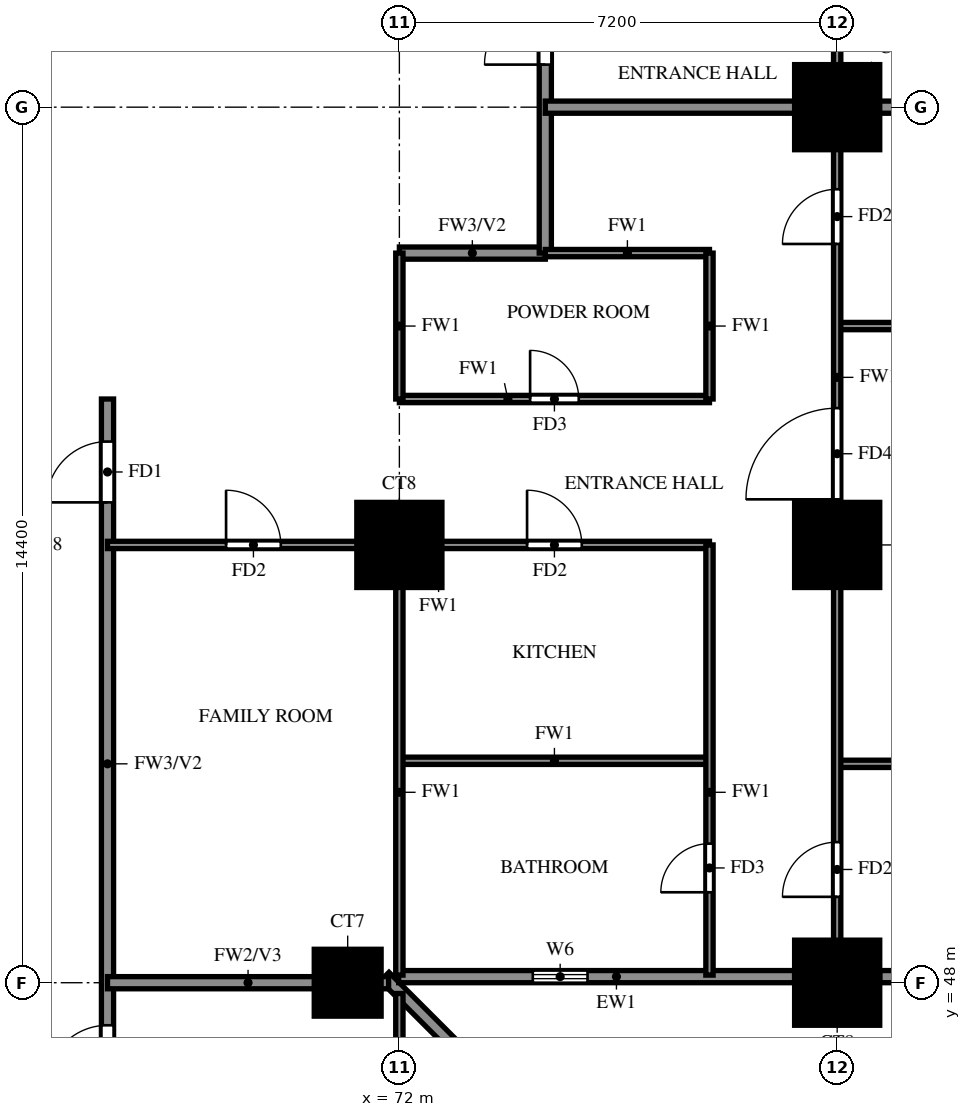
"""IFC4 building model, lengths in metres.
Left out: names, types, materials, properties, quantities, classifications, styles, units other than length and angle.
Written with IfcOpenShell. Run it as: python <this file> out.ifc"""

import sys

from ifc_helpers import new_model, si_unit, direction, frame, frame_2d, origin, origin_2d, place, context, subcontext, project, spatial, rectangle, extrude, source, transform, mapped, element, fill, save


model = new_model("IFC4")
c1 = context("Model", 3, precision=1e-05, world=origin(), true_north=direction((0.0, 1.0)))
c2 = subcontext(c1, "Body", "Model", "MODEL_VIEW")
j1 = project(units=[si_unit("LENGTHUNIT", "METRE"), si_unit("PLANEANGLEUNIT", "RADIAN")], contexts=[c1])
p1 = place(None, origin())
s1 = spatial("IfcSite", under=j1, at=p1, CompositionType="ELEMENT")
p2 = place(p1, origin())
s2 = spatial("IfcBuilding", under=s1, at=p2, CompositionType="ELEMENT")
p3 = place(p2, frame((0.0, 0.0, 41.0)))
s3 = spatial("IfcBuildingStorey", under=s2, at=p3, CompositionType="ELEMENT", Elevation=41.0)
m1 = source(origin(), c2, "Body", "SweptSolid", [
    extrude(rectangle(XDim=1.1, YDim=1.1, at=origin_2d()), origin(), (0.0, 0.0, 1.0), 3.18),
])
p4 = place(p3, frame((71.15, 48.0, 0.0), z_axis=(0.0, 0.0, 1.0), x_axis=(1.0, 0.0, 0.0)))
e1 = element("IfcColumn", 1, at=p4, inside=s3, PredefinedType="COLUMN", context=c2, shape_type="MappedRepresentation", body=[
    mapped(m1, transform((0.0, 0.0, 0.0))),
])
m2 = source(origin(), c2, "Body", "SweptSolid", [
    extrude(rectangle(XDim=1.4, YDim=1.4, at=origin_2d()), origin(), (0.0, 0.0, 1.0), 3.18),
])
for number, where, z_axis, x_axis in (
    (2, (79.2, 48.0, 0.0), (0.0, 0.0, 1.0), (1.0, 0.0, 0.0)),
    (3, (72.0, 55.2, 0.0), (0.0, 0.0, 1.0), (1.0, 0.0, 0.0)),
    (4, (79.2, 55.2, 0.0), (0.0, 0.0, 1.0), (1.0, 0.0, 0.0)),
    (5, (79.2, 62.4, 0.0), (0.0, 0.0, 1.0), (1.0, 0.0, 0.0)),
):
    element("IfcColumn", number, at=place(p3, frame(where, z_axis=z_axis, x_axis=x_axis)), inside=s3, PredefinedType="COLUMN", context=c2, shape_type="MappedRepresentation", body=[
        mapped(m2, transform((0.0, 0.0, 0.0))),
    ])
p5 = place(p3, frame((78.74, 41.118, 0.0), z_axis=(0.0, 0.0, 1.0), x_axis=(-0.707106781187, 0.707106781187, 0.0)))
e6 = element("IfcWall", 6, at=p5, inside=s3, PredefinedType="SOLIDWALL", context=c2, shape_type="SweptSolid", body=[
    extrude(rectangle(XDim=9.874, YDim=0.2, at=frame_2d((4.937, 0.0))), origin(), (0.0, 0.0, 1.0), 3.18),
])
p6 = place(p3, frame((71.989, 48.1, 0.0), z_axis=(0.0, 0.0, 1.0), x_axis=(1.0, 0.0, 0.0)))
e7 = element("IfcWall", 7, at=p6, inside=s3, PredefinedType="SOLIDWALL", context=c2, shape_type="SweptSolid", body=[
    extrude(rectangle(XDim=6.511, YDim=0.2, at=frame_2d((3.256, 0.0))), origin(), (0.0, 0.0, 1.0), 3.18),
])
p7 = place(p6, frame((2.206, 0.0, 1.5)))
e8 = element("IfcOpeningElement", 8, at=p7, cuts=e7, PredefinedType="OPENING", context=c2, shape_type="SweptSolid", body=[
    extrude(rectangle(XDim=0.9, YDim=0.9, at=frame_2d((0.45, 0.45))), frame((0.0, 0.11, 0.0), z_axis=(0.0, -1.0, 0.0), x_axis=(1.0, 0.0, 0.0)), (0.0, 0.0, 1.0), 0.22),
])
p8 = place(p3, frame((79.9, 48.1, 0.0), z_axis=(0.0, 0.0, 1.0), x_axis=(1.0, 0.0, 0.0)))
e9 = element("IfcWall", 9, at=p8, inside=s3, PredefinedType="SOLIDWALL", context=c2, shape_type="SweptSolid", body=[
    extrude(rectangle(XDim=5.35, YDim=0.2, at=frame_2d((2.675, 0.0))), origin(), (0.0, 0.0, 1.0), 3.18),
])
p9 = place(p8, frame((1.475, 0.0, 0.6)))
e10 = element("IfcOpeningElement", 10, at=p9, cuts=e9, PredefinedType="OPENING", context=c2, shape_type="SweptSolid", body=[
    extrude(rectangle(XDim=2.4, YDim=2.4, at=frame_2d((1.2, 1.2))), frame((0.0, 0.11, 0.0), z_axis=(0.0, -1.0, 0.0), x_axis=(1.0, 0.0, 0.0)), (0.0, 0.0, 1.0), 0.22),
])
p10 = place(p3, frame((72.0, 60.0, 0.0), z_axis=(0.0, 0.0, 1.0), x_axis=(1.0, 0.0, 0.0)))
e11 = element("IfcWall", 11, at=p10, inside=s3, PredefinedType="SOLIDWALL", context=c2, shape_type="SweptSolid", body=[
    extrude(rectangle(XDim=2.4, YDim=0.2, at=frame_2d((1.2, 0.0))), origin(), (0.0, 0.0, 1.0), 3.18),
])
p11 = place(p3, frame((67.2, 45.6, 0.0), z_axis=(0.0, 0.0, 1.0), x_axis=(0.0, 1.0, 0.0)))
e12 = element("IfcWall", 12, at=p11, inside=s3, PredefinedType="SOLIDWALL", context=c2, shape_type="SweptSolid", body=[
    extrude(rectangle(XDim=12.0, YDim=0.2, at=frame_2d((6.0, 0.0))), origin(), (0.0, 0.0, 1.0), 3.18),
])
p12 = place(p11, frame((10.3, 0.0, 0.0)))
e13 = element("IfcOpeningElement", 13, at=p12, cuts=e12, PredefinedType="OPENING", context=c2, shape_type="SweptSolid", body=[
    extrude(rectangle(XDim=1.0, YDim=2.1, at=frame_2d((0.5, 1.05))), frame((0.0, 0.11, 0.0), z_axis=(0.0, -1.0, 0.0), x_axis=(1.0, 0.0, 0.0)), (0.0, 0.0, 1.0), 0.22),
])
p13 = place(p11, frame((0.7, 0.0, 0.0)))
e14 = element("IfcOpeningElement", 14, at=p13, cuts=e12, PredefinedType="OPENING", context=c2, shape_type="SweptSolid", body=[
    extrude(rectangle(XDim=1.0, YDim=2.1, at=frame_2d((0.5, 1.05))), frame((0.0, 0.11, 0.0), z_axis=(0.0, -1.0, 0.0), x_axis=(1.0, 0.0, 0.0)), (0.0, 0.0, 1.0), 0.22),
])
p14 = place(p3, frame((74.4, 60.0, 0.0), z_axis=(0.0, 0.0, 1.0), x_axis=(0.0, 1.0, 0.0)))
e15 = element("IfcWall", 15, at=p14, inside=s3, PredefinedType="SOLIDWALL", context=c2, shape_type="SweptSolid", body=[
    extrude(rectangle(XDim=9.45, YDim=0.2, at=frame_2d((4.725, 0.0))), origin(), (0.0, 0.0, 1.0), 3.18),
])
p15 = place(p14, frame((3.1, 0.0, 0.0)))
e16 = element("IfcOpeningElement", 16, at=p15, cuts=e15, PredefinedType="OPENING", context=c2, shape_type="SweptSolid", body=[
    extrude(rectangle(XDim=1.0, YDim=2.1, at=frame_2d((0.5, 1.05))), frame((0.0, 0.11, 0.0), z_axis=(0.0, -1.0, 0.0), x_axis=(1.0, 0.0, 0.0)), (0.0, 0.0, 1.0), 0.22),
])
p16 = place(p3, frame((67.2, 48.0, 0.0), z_axis=(0.0, 0.0, 1.0), x_axis=(1.0, 0.0, 0.0)))
e17 = element("IfcWall", 17, at=p16, inside=s3, PredefinedType="SOLIDWALL", context=c2, shape_type="SweptSolid", body=[
    extrude(rectangle(XDim=4.623, YDim=0.2, at=frame_2d((2.312, 0.0))), origin(), (0.0, 0.0, 1.0), 3.18),
])
p17 = place(p3, frame((74.4, 62.4, 0.0), z_axis=(0.0, 0.0, 1.0), x_axis=(1.0, 0.0, 0.0)))
e18 = element("IfcWall", 18, at=p17, inside=s3, PredefinedType="SOLIDWALL", context=c2, shape_type="SweptSolid", body=[
    extrude(rectangle(XDim=11.875, YDim=0.2, at=frame_2d((5.938, 0.0))), origin(), (0.0, 0.0, 1.0), 3.18),
])
p18 = place(p3, frame((79.2, 51.6, 0.0), z_axis=(0.0, 0.0, 1.0), x_axis=(1.0, 0.0, 0.0)))
e19 = element("IfcWall", 19, at=p18, inside=s3, PredefinedType="PARTITIONING", context=c2, shape_type="SweptSolid", body=[
    extrude(rectangle(XDim=7.075, YDim=0.12, at=frame_2d((3.538, 0.0))), origin(), (0.0, 0.0, 1.0), 2.28),
])
p19 = place(p3, frame((72.0, 51.65, 0.0), z_axis=(0.0, 0.0, 1.0), x_axis=(1.0, 0.0, 0.0)))
e20 = element("IfcWall", 20, at=p19, inside=s3, PredefinedType="PARTITIONING", context=c2, shape_type="SweptSolid", body=[
    extrude(rectangle(XDim=5.1, YDim=0.12, at=frame_2d((2.55, 0.0))), origin(), (0.0, 0.0, 1.0), 3.18),
])
p20 = place(p3, frame((67.2, 55.2, 0.0), z_axis=(0.0, 0.0, 1.0), x_axis=(1.0, 0.0, 0.0)))
e21 = element("IfcWall", 21, at=p20, inside=s3, PredefinedType="PARTITIONING", context=c2, shape_type="SweptSolid", body=[
    extrude(rectangle(XDim=9.9, YDim=0.12, at=frame_2d((4.95, 0.0))), origin(), (0.0, 0.0, 1.0), 3.18),
])
p21 = place(p20, frame((6.9, 0.0, 0.0)))
e22 = element("IfcOpeningElement", 22, at=p21, cuts=e21, PredefinedType="OPENING", context=c2, shape_type="SweptSolid", body=[
    extrude(rectangle(XDim=0.9, YDim=2.1, at=frame_2d((0.45, 1.05))), frame((0.0, 0.07, 0.0), z_axis=(0.0, -1.0, 0.0), x_axis=(1.0, 0.0, 0.0)), (0.0, 0.0, 1.0), 0.14),
])
p22 = place(p20, frame((1.95, 0.0, 0.0)))
e23 = element("IfcOpeningElement", 23, at=p22, cuts=e21, PredefinedType="OPENING", context=c2, shape_type="SweptSolid", body=[
    extrude(rectangle(XDim=0.9, YDim=2.1, at=frame_2d((0.45, 1.05))), frame((0.0, 0.07, 0.0), z_axis=(0.0, -1.0, 0.0), x_axis=(1.0, 0.0, 0.0)), (0.0, 0.0, 1.0), 0.14),
])
p23 = place(p3, frame((72.0, 57.6, 0.0), z_axis=(0.0, 0.0, 1.0), x_axis=(1.0, 0.0, 0.0)))
e24 = element("IfcWall", 24, at=p23, inside=s3, PredefinedType="PARTITIONING", context=c2, shape_type="SweptSolid", body=[
    extrude(rectangle(XDim=5.1, YDim=0.12, at=frame_2d((2.55, 0.0))), origin(), (0.0, 0.0, 1.0), 3.18),
])
p24 = place(p23, frame((2.15, 0.0, 0.0)))
e25 = element("IfcOpeningElement", 25, at=p24, cuts=e24, PredefinedType="OPENING", context=c2, shape_type="SweptSolid", body=[
    extrude(rectangle(XDim=0.8, YDim=2.1, at=frame_2d((0.4, 1.05))), frame((0.0, 0.07, 0.0), z_axis=(0.0, -1.0, 0.0), x_axis=(1.0, 0.0, 0.0)), (0.0, 0.0, 1.0), 0.14),
])
p25 = place(p3, frame((79.2, 58.8, 0.0), z_axis=(0.0, 0.0, 1.0), x_axis=(1.0, 0.0, 0.0)))
e26 = element("IfcWall", 26, at=p25, inside=s3, PredefinedType="PARTITIONING", context=c2, shape_type="SweptSolid", body=[
    extrude(rectangle(XDim=7.075, YDim=0.12, at=frame_2d((3.538, 0.0))), origin(), (0.0, 0.0, 1.0), 2.28),
])
p26 = place(p3, frame((74.4, 60.0, 0.0), z_axis=(0.0, 0.0, 1.0), x_axis=(1.0, 0.0, 0.0)))
e27 = element("IfcWall", 27, at=p26, inside=s3, PredefinedType="PARTITIONING", context=c2, shape_type="SweptSolid", body=[
    extrude(rectangle(XDim=2.7, YDim=0.12, at=frame_2d((1.35, 0.0))), origin(), (0.0, 0.0, 1.0), 3.18),
])
p27 = place(p3, frame((72.0, 33.725, 0.0), z_axis=(0.0, 0.0, 1.0), x_axis=(0.0, 1.0, 0.0)))
e28 = element("IfcWall", 28, at=p27, inside=s3, PredefinedType="PARTITIONING", context=c2, shape_type="SweptSolid", body=[
    extrude(rectangle(XDim=14.098, YDim=0.12, at=frame_2d((7.049, 0.0))), origin(), (0.0, 0.0, 1.0), 2.28),
])
p28 = place(p27, frame((10.075, 0.0, 0.0)))
e29 = element("IfcOpeningElement", 29, at=p28, cuts=e28, PredefinedType="OPENING", context=c2, shape_type="SweptSolid", body=[
    extrude(rectangle(XDim=0.9, YDim=2.1, at=frame_2d((0.45, 1.05))), frame((0.0, 0.07, 0.0), z_axis=(0.0, -1.0, 0.0), x_axis=(1.0, 0.0, 0.0)), (0.0, 0.0, 1.0), 0.14),
])
p29 = place(p3, frame((72.0, 48.125, 0.0), z_axis=(0.0, 0.0, 1.0), x_axis=(0.0, 1.0, 0.0)))
e30 = element("IfcWall", 30, at=p29, inside=s3, PredefinedType="PARTITIONING", context=c2, shape_type="SweptSolid", body=[
    extrude(rectangle(XDim=7.075, YDim=0.12, at=frame_2d((3.538, 0.0))), origin(), (0.0, 0.0, 1.0), 3.18),
])
p30 = place(p3, frame((72.0, 57.6, 0.0), z_axis=(0.0, 0.0, 1.0), x_axis=(0.0, 1.0, 0.0)))
e31 = element("IfcWall", 31, at=p30, inside=s3, PredefinedType="PARTITIONING", context=c2, shape_type="SweptSolid", body=[
    extrude(rectangle(XDim=2.4, YDim=0.12, at=frame_2d((1.2, 0.0))), origin(), (0.0, 0.0, 1.0), 3.18),
])
p31 = place(p3, frame((77.1, 48.125, 0.0), z_axis=(0.0, 0.0, 1.0), x_axis=(0.0, 1.0, 0.0)))
e32 = element("IfcWall", 32, at=p31, inside=s3, PredefinedType="PARTITIONING", context=c2, shape_type="SweptSolid", body=[
    extrude(rectangle(XDim=7.075, YDim=0.12, at=frame_2d((3.538, 0.0))), origin(), (0.0, 0.0, 1.0), 3.18),
])
p32 = place(p31, frame((1.363, 0.0, 0.0)))
e33 = element("IfcOpeningElement", 33, at=p32, cuts=e32, PredefinedType="OPENING", context=c2, shape_type="SweptSolid", body=[
    extrude(rectangle(XDim=0.8, YDim=2.1, at=frame_2d((0.4, 1.05))), frame((0.0, 0.07, 0.0), z_axis=(0.0, -1.0, 0.0), x_axis=(1.0, 0.0, 0.0)), (0.0, 0.0, 1.0), 0.14),
])
p33 = place(p3, frame((77.1, 57.6, 0.0), z_axis=(0.0, 0.0, 1.0), x_axis=(0.0, 1.0, 0.0)))
e34 = element("IfcWall", 34, at=p33, inside=s3, PredefinedType="PARTITIONING", context=c2, shape_type="SweptSolid", body=[
    extrude(rectangle(XDim=2.4, YDim=0.12, at=frame_2d((1.2, 0.0))), origin(), (0.0, 0.0, 1.0), 3.18),
])
p34 = place(p3, frame((79.2, 48.125, 0.0), z_axis=(0.0, 0.0, 1.0), x_axis=(0.0, 1.0, 0.0)))
e35 = element("IfcWall", 35, at=p34, inside=s3, PredefinedType="PARTITIONING", context=c2, shape_type="SweptSolid", body=[
    extrude(rectangle(XDim=17.875, YDim=0.12, at=frame_2d((8.938, 0.0))), origin(), (0.0, 0.0, 1.0), 3.18),
])
p35 = place(p34, frame((1.288, 0.0, 0.0)))
e36 = element("IfcOpeningElement", 36, at=p35, cuts=e35, PredefinedType="OPENING", context=c2, shape_type="SweptSolid", body=[
    extrude(rectangle(XDim=0.9, YDim=2.1, at=frame_2d((0.45, 1.05))), frame((0.0, 0.07, 0.0), z_axis=(0.0, -1.0, 0.0), x_axis=(1.0, 0.0, 0.0)), (0.0, 0.0, 1.0), 0.14),
])
p36 = place(p34, frame((7.825, 0.0, 0.0)))
e37 = element("IfcOpeningElement", 37, at=p36, cuts=e35, PredefinedType="OPENING", context=c2, shape_type="SweptSolid", body=[
    extrude(rectangle(XDim=1.5, YDim=2.1, at=frame_2d((0.75, 1.05))), frame((0.0, 0.07, 0.0), z_axis=(0.0, -1.0, 0.0), x_axis=(1.0, 0.0, 0.0)), (0.0, 0.0, 1.0), 0.14),
])
p37 = place(p34, frame((12.025, 0.0, 0.0)))
e38 = element("IfcOpeningElement", 38, at=p37, cuts=e35, PredefinedType="OPENING", context=c2, shape_type="SweptSolid", body=[
    extrude(rectangle(XDim=0.9, YDim=2.1, at=frame_2d((0.45, 1.05))), frame((0.0, 0.07, 0.0), z_axis=(0.0, -1.0, 0.0), x_axis=(1.0, 0.0, 0.0)), (0.0, 0.0, 1.0), 0.14),
])
p38 = place(p34, frame((15.625, 0.0, 0.0)))
e39 = element("IfcOpeningElement", 39, at=p38, cuts=e35, PredefinedType="OPENING", context=c2, shape_type="SweptSolid", body=[
    extrude(rectangle(XDim=0.9, YDim=2.1, at=frame_2d((0.45, 1.05))), frame((0.0, 0.07, 0.0), z_axis=(0.0, -1.0, 0.0), x_axis=(1.0, 0.0, 0.0)), (0.0, 0.0, 1.0), 0.14),
])
p39 = place(p7, origin())
e40 = element("IfcWindow", 40, at=p39, inside=s3, PartitioningType="SINGLE_PANEL", PredefinedType="WINDOW", context=c2, shape_type="SweptSolid", body=[
    extrude(rectangle(XDim=0.9, YDim=0.9, at=frame_2d((0.45, 0.45))), frame((0.0, 0.03, 0.0), z_axis=(0.0, -1.0, 0.0), x_axis=(1.0, 0.0, 0.0)), (0.0, 0.0, 1.0), 0.06),
])
fill(e8, e40)
p40 = place(p12, origin())
e41 = element("IfcDoor", 41, at=p40, inside=s3, OperationType="SINGLE_SWING_RIGHT", PredefinedType="DOOR", context=c2, shape_type="SweptSolid", body=[
    extrude(rectangle(XDim=1.0, YDim=2.1, at=frame_2d((0.5, 1.05))), frame((0.0, 0.025, 0.0), z_axis=(0.0, -1.0, 0.0), x_axis=(1.0, 0.0, 0.0)), (0.0, 0.0, 1.0), 0.05),
])
fill(e13, e41)
p41 = place(p35, origin())
e42 = element("IfcDoor", 42, at=p41, inside=s3, OperationType="SINGLE_SWING_LEFT", PredefinedType="DOOR", context=c2, shape_type="SweptSolid", body=[
    extrude(rectangle(XDim=0.9, YDim=2.1, at=frame_2d((0.45, 1.05))), frame((0.0, 0.025, 0.0), z_axis=(0.0, -1.0, 0.0), x_axis=(1.0, 0.0, 0.0)), (0.0, 0.0, 1.0), 0.05),
])
fill(e36, e42)
p42 = place(p36, origin())
e43 = element("IfcDoor", 43, at=p42, inside=s3, OperationType="SINGLE_SWING_RIGHT", PredefinedType="DOOR", context=c2, shape_type="SweptSolid", body=[
    extrude(rectangle(XDim=1.5, YDim=2.1, at=frame_2d((0.75, 1.05))), frame((0.0, 0.025, 0.0), z_axis=(0.0, -1.0, 0.0), x_axis=(1.0, 0.0, 0.0)), (0.0, 0.0, 1.0), 0.05),
])
fill(e37, e43)
p43 = place(p37, origin())
e44 = element("IfcDoor", 44, at=p43, inside=s3, OperationType="SINGLE_SWING_RIGHT", PredefinedType="DOOR", context=c2, shape_type="SweptSolid", body=[
    extrude(rectangle(XDim=0.9, YDim=2.1, at=frame_2d((0.45, 1.05))), frame((0.0, 0.025, 0.0), z_axis=(0.0, -1.0, 0.0), x_axis=(1.0, 0.0, 0.0)), (0.0, 0.0, 1.0), 0.05),
])
fill(e38, e44)
p44 = place(p32, origin())
e45 = element("IfcDoor", 45, at=p44, inside=s3, OperationType="SINGLE_SWING_LEFT", PredefinedType="DOOR", context=c2, shape_type="SweptSolid", body=[
    extrude(rectangle(XDim=0.8, YDim=2.1, at=frame_2d((0.4, 1.05))), frame((0.0, 0.025, 0.0), z_axis=(0.0, -1.0, 0.0), x_axis=(1.0, 0.0, 0.0)), (0.0, 0.0, 1.0), 0.05),
])
fill(e33, e45)
p45 = place(p21, origin())
e46 = element("IfcDoor", 46, at=p45, inside=s3, OperationType="SINGLE_SWING_LEFT", PredefinedType="DOOR", context=c2, shape_type="SweptSolid", body=[
    extrude(rectangle(XDim=0.9, YDim=2.1, at=frame_2d((0.45, 1.05))), frame((0.0, 0.025, 0.0), z_axis=(0.0, -1.0, 0.0), x_axis=(1.0, 0.0, 0.0)), (0.0, 0.0, 1.0), 0.05),
])
fill(e22, e46)
p46 = place(p24, origin())
e47 = element("IfcDoor", 47, at=p46, inside=s3, OperationType="SINGLE_SWING_RIGHT", PredefinedType="DOOR", context=c2, shape_type="SweptSolid", body=[
    extrude(rectangle(XDim=0.8, YDim=2.1, at=frame_2d((0.4, 1.05))), frame((0.0, 0.025, 0.0), z_axis=(0.0, -1.0, 0.0), x_axis=(1.0, 0.0, 0.0)), (0.0, 0.0, 1.0), 0.05),
])
fill(e25, e47)
p47 = place(p22, origin())
e48 = element("IfcDoor", 48, at=p47, inside=s3, OperationType="SINGLE_SWING_LEFT", PredefinedType="DOOR", context=c2, shape_type="SweptSolid", body=[
    extrude(rectangle(XDim=0.9, YDim=2.1, at=frame_2d((0.45, 1.05))), frame((0.0, 0.025, 0.0), z_axis=(0.0, -1.0, 0.0), x_axis=(1.0, 0.0, 0.0)), (0.0, 0.0, 1.0), 0.05),
])
fill(e23, e48)
p48 = place(p15, origin())
e49 = element("IfcDoor", 49, at=p48, inside=s3, OperationType="SINGLE_SWING_LEFT", PredefinedType="DOOR", context=c2, shape_type="SweptSolid", body=[
    extrude(rectangle(XDim=1.0, YDim=2.1, at=frame_2d((0.5, 1.05))), frame((0.0, 0.025, 0.0), z_axis=(0.0, -1.0, 0.0), x_axis=(1.0, 0.0, 0.0)), (0.0, 0.0, 1.0), 0.05),
])
fill(e16, e49)
p49 = place(p13, origin())
e50 = element("IfcDoor", 50, at=p49, inside=s3, OperationType="SINGLE_SWING_RIGHT", PredefinedType="DOOR", context=c2, shape_type="SweptSolid", body=[
    extrude(rectangle(XDim=1.0, YDim=2.1, at=frame_2d((0.5, 1.05))), frame((0.0, 0.025, 0.0), z_axis=(0.0, -1.0, 0.0), x_axis=(1.0, 0.0, 0.0)), (0.0, 0.0, 1.0), 0.05),
])
fill(e14, e50)
save(model, sys.argv[1])
